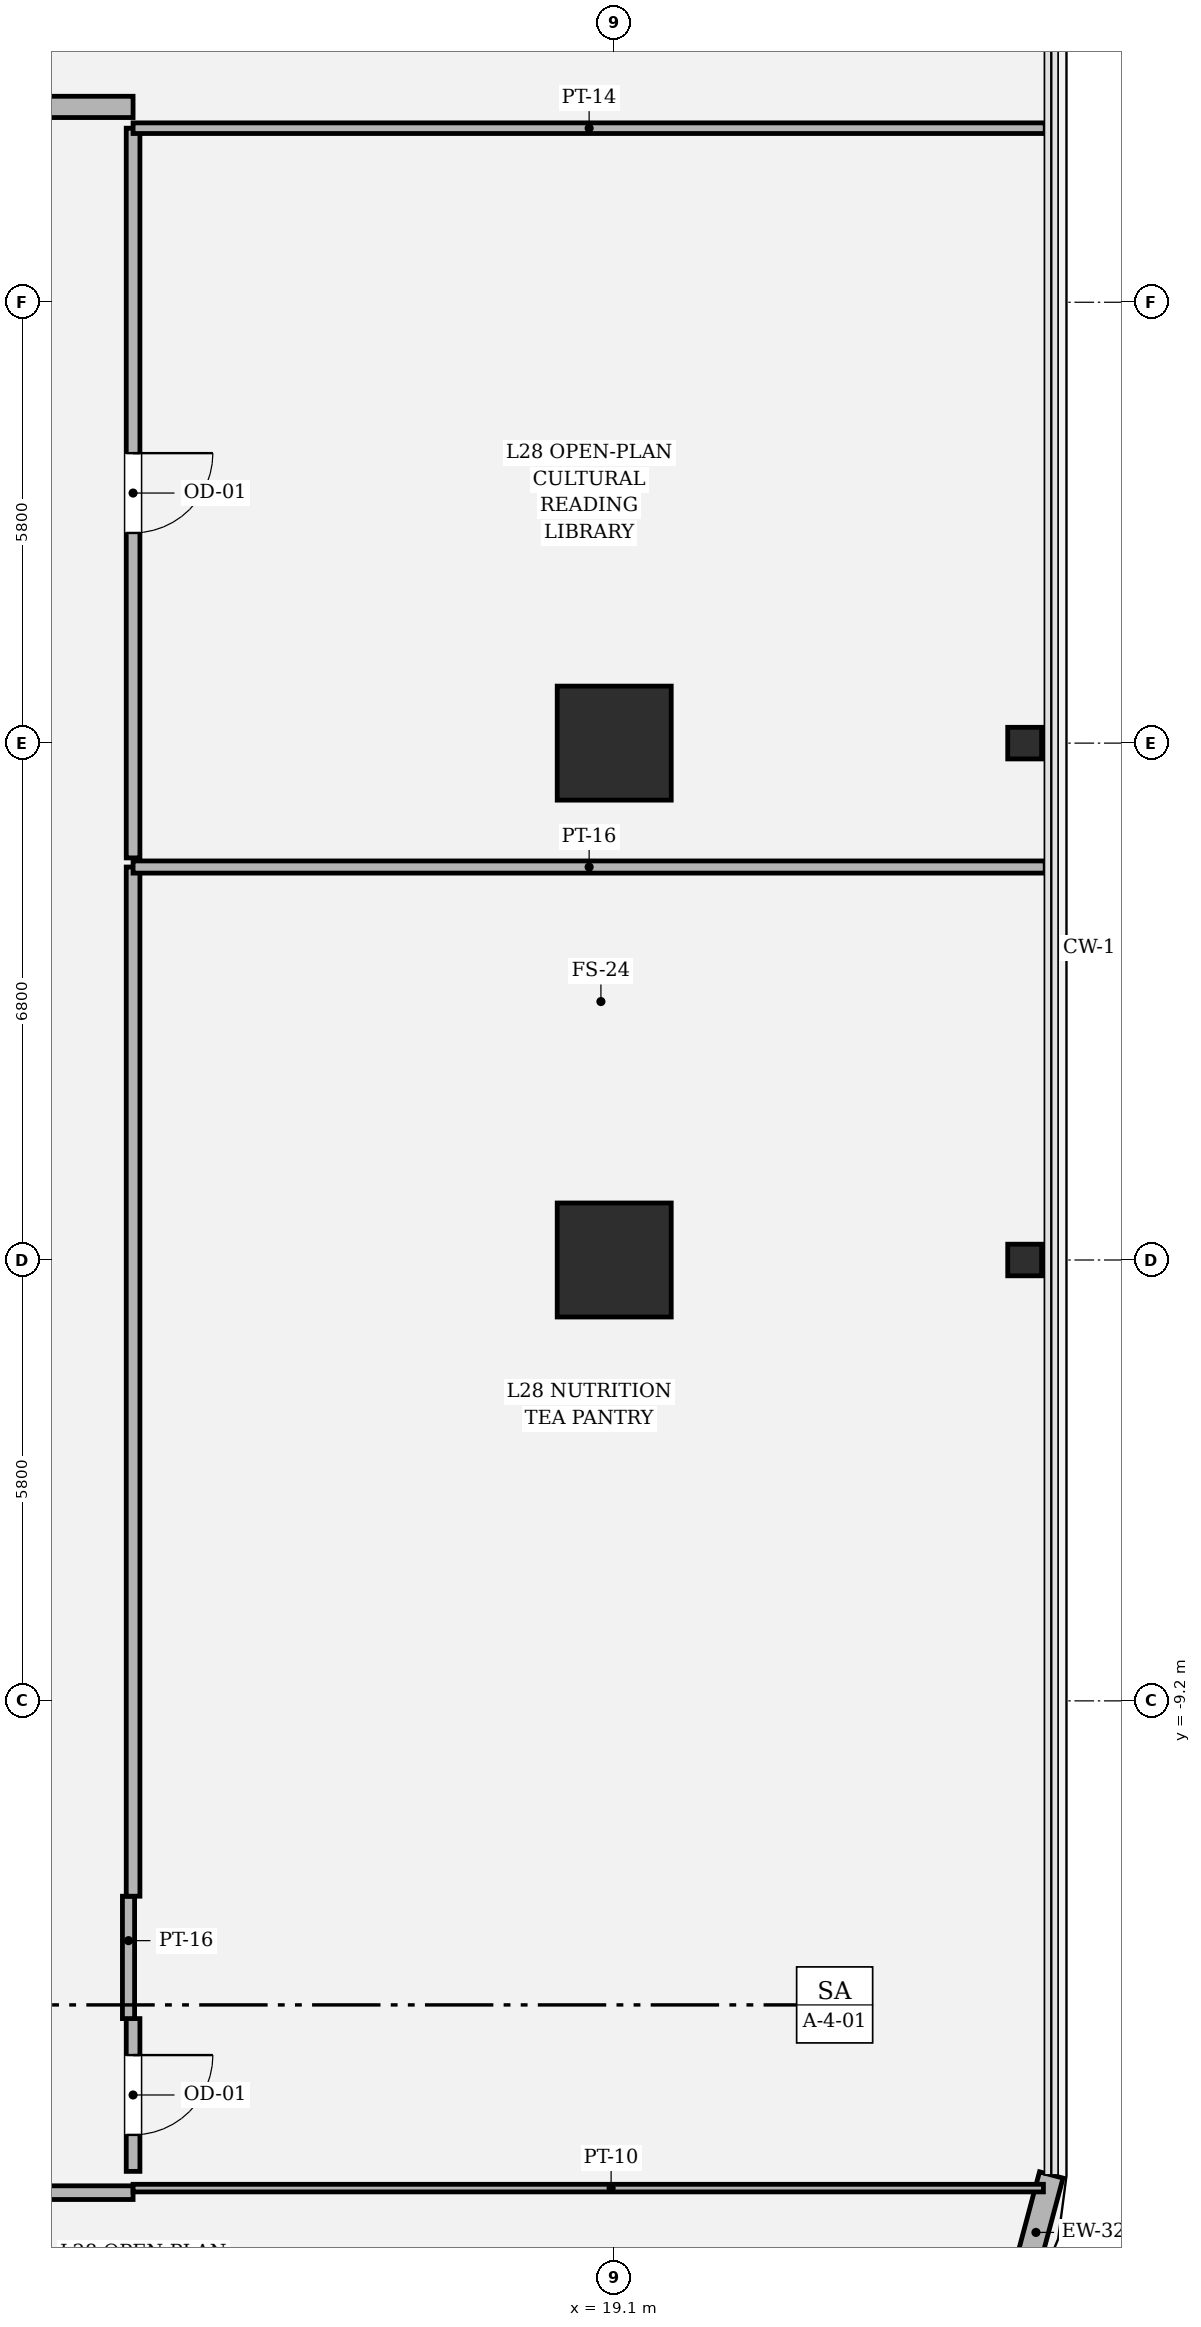
"""IFC4 building model, lengths in metres.
Left out: names, types, materials, properties, quantities, classifications, styles, units other than length and angle.
Written with IfcOpenShell. Run it as: python <this file> out.ifc"""

import sys

from ifc_helpers import new_model, si_unit, direction, frame, frame_2d, origin, origin_2d, place, context, subcontext, project, spatial, rectangle, hollow_rectangle, i_section, extrude, element, fill, save


model = new_model("IFC4")
c1 = context("Model", 3, precision=1e-05, world=origin(), true_north=direction((0.0, 1.0)))
c2 = subcontext(c1, "Body", "Model", "MODEL_VIEW")
j1 = project(units=[si_unit("LENGTHUNIT", "METRE"), si_unit("PLANEANGLEUNIT", "RADIAN")], contexts=[c1])
p1 = place(None, origin())
s1 = spatial("IfcSite", under=j1, at=p1, CompositionType="ELEMENT")
p2 = place(p1, origin())
s2 = spatial("IfcBuilding", under=s1, at=p2, CompositionType="ELEMENT")
p3 = place(p2, frame((0.0, 0.0, 121.35)))
s3 = spatial("IfcBuildingStorey", under=s2, at=p3, CompositionType="ELEMENT", Elevation=121.35)
for number, where, z_axis, x_axis in (
    (1, (19.1, -3.4, 0.0), (0.0, 0.0, 1.0), (1.0, 0.0, 0.0)),
    (2, (19.1, 3.4, 0.0), (0.0, 0.0, 1.0), (1.0, 0.0, 0.0)),
):
    element("IfcColumn", number, at=place(p3, frame(where, z_axis=z_axis, x_axis=x_axis)), inside=s3, PredefinedType="COLUMN", context=c2, shape_type="SweptSolid", body=[
        extrude(hollow_rectangle(XDim=1.5, YDim=1.5, WallThickness=0.045, at=origin_2d()), origin(), (0.0, 0.0, 1.0), 4.05),
    ])
for number, where, z_axis, x_axis in (
    (3, (24.5, -3.4, 0.0), (0.0, 0.0, 1.0), (0.0, 1.0, 0.0)),
    (4, (24.5, 3.4, 0.0), (0.0, 0.0, 1.0), (0.0, 1.0, 0.0)),
):
    element("IfcColumn", number, at=place(p3, frame(where, z_axis=z_axis, x_axis=x_axis)), inside=s3, PredefinedType="COLUMN", context=c2, shape_type="SweptSolid", body=[
        extrude(i_section(OverallWidth=0.416, OverallDepth=0.446, WebThickness=0.039, FlangeThickness=0.062, FilletRadius=0.018, at=origin_2d()), origin(), (0.0, 0.0, 1.0), 4.048),
    ])
p4 = place(p3, frame((24.447, -16.949, 0.0), z_axis=(0.0, 0.0, 1.0), x_axis=(0.257847112249, 0.966185730957, 0.0)))
e5 = element("IfcWall", 5, at=p4, inside=s3, PredefinedType="SOLIDWALL", context=c2, shape_type="SweptSolid", body=[
    extrude(rectangle(XDim=1.565, YDim=0.32, at=frame_2d((0.783, 0.0))), origin(), (0.0, 0.0, 1.0), 3.73),
])
p5 = place(p3, frame((1.2, -15.67, 0.0), z_axis=(0.0, 0.0, 1.0), x_axis=(1.0, 0.0, 0.0)))
e6 = element("IfcWall", 6, at=p5, inside=s3, PredefinedType="PARTITIONING", context=c2, shape_type="SweptSolid", body=[
    extrude(rectangle(XDim=11.57, YDim=0.18, at=frame_2d((5.785, 0.0))), origin(), (0.0, 0.0, 1.0), 2.404),
])
p6 = place(p5, frame((5.275, 0.0, 0.0)))
e7 = element("IfcOpeningElement", 7, at=p6, cuts=e6, PredefinedType="OPENING", context=c2, shape_type="SweptSolid", body=[
    extrude(rectangle(XDim=1.02, YDim=2.2, at=frame_2d((0.51, 1.1))), frame((0.0, 0.1, 0.0), z_axis=(0.0, -1.0, 0.0), x_axis=(1.0, 0.0, 0.0)), (0.0, 0.0, 1.0), 0.2),
])
p7 = place(p3, frame((12.77, -15.61, 0.0), z_axis=(0.0, 0.0, 1.0), x_axis=(1.0, 0.0, 0.0)))
e8 = element("IfcWall", 8, at=p7, inside=s3, PredefinedType="PARTITIONING", context=c2, shape_type="SweptSolid", body=[
    extrude(rectangle(XDim=11.977, YDim=0.1, at=frame_2d((5.988, 0.0))), origin(), (0.0, 0.0, 1.0), 2.404),
])
p8 = place(p3, frame((12.77, -15.39, 0.0), z_axis=(0.0, 0.0, 1.0), x_axis=(0.0, 1.0, 0.0)))
e9 = element("IfcWall", 9, at=p8, inside=s3, PredefinedType="PARTITIONING", context=c2, shape_type="SweptSolid", body=[
    extrude(rectangle(XDim=2.01, YDim=0.18, at=frame_2d((1.005, 0.0))), origin(), (0.0, 0.0, 1.0), 2.444),
])
p9 = place(p8, frame((0.48, 0.0, 0.0)))
e10 = element("IfcOpeningElement", 10, at=p9, cuts=e9, PredefinedType="OPENING", context=c2, shape_type="SweptSolid", body=[
    extrude(rectangle(XDim=1.05, YDim=2.2, at=frame_2d((0.525, 1.1))), frame((0.0, 0.1, 0.0), z_axis=(0.0, -1.0, 0.0), x_axis=(1.0, 0.0, 0.0)), (0.0, 0.0, 1.0), 0.2),
])
p10 = place(p3, frame((12.71, -13.38, 0.0), z_axis=(0.0, 0.0, 1.0), x_axis=(0.0, 1.0, 0.0)))
e11 = element("IfcWall", 11, at=p10, inside=s3, PredefinedType="PARTITIONING", context=c2, shape_type="SweptSolid", body=[
    extrude(rectangle(XDim=1.61, YDim=0.16, at=frame_2d((0.805, 0.0))), origin(), (0.0, 0.0, 1.0), 2.444),
])
p11 = place(p3, frame((12.77, -11.77, 0.0), z_axis=(0.0, 0.0, 1.0), x_axis=(0.0, 1.0, 0.0)))
e12 = element("IfcWall", 12, at=p11, inside=s3, PredefinedType="PARTITIONING", context=c2, shape_type="SweptSolid", body=[
    extrude(rectangle(XDim=13.54, YDim=0.18, at=frame_2d((6.77, 0.0))), origin(), (0.0, 0.0, 1.0), 2.404),
])
p12 = place(p3, frame((12.77, 1.77, 0.0), z_axis=(0.0, 0.0, 1.0), x_axis=(1.0, 0.0, 0.0)))
e13 = element("IfcWall", 13, at=p12, inside=s3, PredefinedType="PARTITIONING", context=c2, shape_type="SweptSolid", body=[
    extrude(rectangle(XDim=12.0, YDim=0.16, at=frame_2d((6.0, 0.0))), origin(), (0.0, 0.0, 1.0), 2.404),
])
p13 = place(p3, frame((12.77, 1.89, 0.0), z_axis=(0.0, 0.0, 1.0), x_axis=(0.0, 1.0, 0.0)))
e14 = element("IfcWall", 14, at=p13, inside=s3, PredefinedType="PARTITIONING", context=c2, shape_type="SweptSolid", body=[
    extrude(rectangle(XDim=9.6, YDim=0.18, at=frame_2d((4.8, 0.0))), origin(), (0.0, 0.0, 1.0), 2.404),
])
p14 = place(p13, frame((4.275, 0.0, 0.0)))
e15 = element("IfcOpeningElement", 15, at=p14, cuts=e14, PredefinedType="OPENING", context=c2, shape_type="SweptSolid", body=[
    extrude(rectangle(XDim=1.05, YDim=2.2, at=frame_2d((0.525, 1.1))), frame((0.0, 0.1, 0.0), z_axis=(0.0, -1.0, 0.0), x_axis=(1.0, 0.0, 0.0)), (0.0, 0.0, 1.0), 0.2),
])
p15 = place(p3, frame((12.77, 11.49, 0.0), z_axis=(0.0, 0.0, 1.0), x_axis=(1.0, 0.0, 0.0)))
e16 = element("IfcWall", 16, at=p15, inside=s3, PredefinedType="PARTITIONING", context=c2, shape_type="SweptSolid", body=[
    extrude(rectangle(XDim=12.0, YDim=0.14, at=frame_2d((6.0, 0.0))), origin(), (0.0, 0.0, 1.0), 2.404),
])
p16 = place(p3, frame((12.77, 11.77, 0.0), z_axis=(0.0, 0.0, 1.0), x_axis=(-1.0, 0.0, 0.0)))
e17 = element("IfcWall", 17, at=p16, inside=s3, PredefinedType="SOLIDWALL", context=c2, shape_type="SweptSolid", body=[
    extrude(rectangle(XDim=25.54, YDim=0.28, at=frame_2d((12.77, 0.0))), origin(), (0.0, 0.0, 1.0), 2.404),
])
p17 = place(p16, frame((12.22, 0.0, 0.0)))
e18 = element("IfcOpeningElement", 18, at=p17, cuts=e17, PredefinedType="OPENING", context=c2, shape_type="SweptSolid", body=[
    extrude(rectangle(XDim=1.1, YDim=2.2, at=frame_2d((0.55, 1.1))), frame((0.0, 0.15, 0.0), z_axis=(0.0, -1.0, 0.0), x_axis=(1.0, 0.0, 0.0)), (0.0, 0.0, 1.0), 0.3),
])
p18 = place(p9, origin())
e19 = element("IfcDoor", 19, at=p18, inside=s3, OperationType="SINGLE_SWING_RIGHT", PredefinedType="DOOR", context=c2, shape_type="SweptSolid", body=[
    extrude(rectangle(XDim=1.05, YDim=2.2, at=frame_2d((0.525, 1.1))), frame((0.0, 0.025, 0.0), z_axis=(0.0, -1.0, 0.0), x_axis=(1.0, 0.0, 0.0)), (0.0, 0.0, 1.0), 0.05),
])
fill(e10, e19)
p19 = place(p14, origin())
e20 = element("IfcDoor", 20, at=p19, inside=s3, OperationType="SINGLE_SWING_RIGHT", PredefinedType="DOOR", context=c2, shape_type="SweptSolid", body=[
    extrude(rectangle(XDim=1.05, YDim=2.2, at=frame_2d((0.525, 1.1))), frame((0.0, 0.025, 0.0), z_axis=(0.0, -1.0, 0.0), x_axis=(1.0, 0.0, 0.0)), (0.0, 0.0, 1.0), 0.05),
])
fill(e15, e20)
save(model, sys.argv[1])
